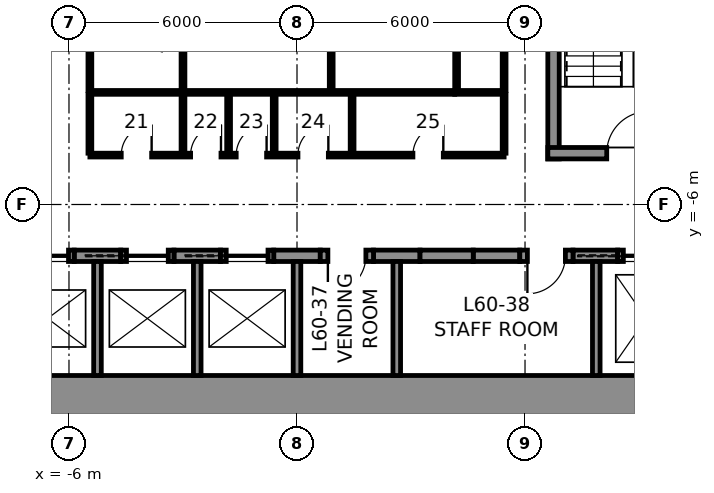
"""IFC4 building model, lengths in metres.
Left out: names, types, materials, properties, quantities, classifications, styles, units other than length and angle.
Written with IfcOpenShell. Run it as: python <this file> out.ifc"""

import sys

from ifc_helpers import new_model, si_unit, direction, frame, frame_2d, origin, place, context, subcontext, project, spatial, rectangle, extrude, element, fill, save


model = new_model("IFC4")
c1 = context("Model", 3, precision=1e-05, world=origin(), true_north=direction((0.0, 1.0)))
c2 = subcontext(c1, "Body", "Model", "MODEL_VIEW")
j1 = project(units=[si_unit("LENGTHUNIT", "METRE"), si_unit("PLANEANGLEUNIT", "RADIAN")], contexts=[c1])
p1 = place(None, origin())
s1 = spatial("IfcSite", under=j1, at=p1, CompositionType="ELEMENT")
p2 = place(p1, origin())
s2 = spatial("IfcBuilding", under=s1, at=p2, CompositionType="ELEMENT")
p3 = place(p2, frame((0.0, 0.0, 269.8)))
s3 = spatial("IfcBuildingStorey", under=s2, at=p3, CompositionType="ELEMENT", Elevation=269.8)
p4 = place(p3, frame((12.0, -11.25, 0.0), z_axis=(0.0, 0.0, 1.0), x_axis=(-1.0, 0.0, 0.0)))
e1 = element("IfcWall", 1, at=p4, inside=s3, PredefinedType="SHEAR", context=c2, shape_type="SweptSolid", body=[
    extrude(rectangle(XDim=24.0, YDim=1.5, at=frame_2d((12.0, 0.0))), origin(), (0.0, 0.0, 1.0), 4.0),
])
for number, where, z_axis, x_axis in (
    (2, (-5.863, -7.35, 0.0), (0.0, 0.0, 1.0), (1.0, 0.0, 0.0)),
    (3, (-3.238, -7.35, 0.0), (0.0, 0.0, 1.0), (1.0, 0.0, 0.0)),
    (4, (-0.613, -7.35, 0.0), (0.0, 0.0, 1.0), (1.0, 0.0, 0.0)),
    (5, (2.012, -7.35, 0.0), (0.0, 0.0, 1.0), (1.0, 0.0, 0.0)),
    (6, (4.637, -7.35, 0.0), (0.0, 0.0, 1.0), (1.0, 0.0, 0.0)),
):
    element("IfcWall", number, at=place(p3, frame(where, z_axis=z_axis, x_axis=x_axis)), inside=s3, PredefinedType="SHEAR", context=c2, shape_type="SweptSolid", body=[
        extrude(rectangle(XDim=1.225, YDim=0.3, at=frame_2d((0.613, 0.0))), origin(), (0.0, 0.0, 1.0), 4.0),
    ])
p5 = place(p3, frame((7.262, -7.35, 0.0), z_axis=(0.0, 0.0, 1.0), x_axis=(1.0, 0.0, 0.0)))
e7 = element("IfcWall", 7, at=p5, inside=s3, PredefinedType="SHEAR", context=c2, shape_type="SweptSolid", body=[
    extrude(rectangle(XDim=1.175, YDim=0.3, at=frame_2d((0.587, 0.0))), origin(), (0.0, 0.0, 1.0), 4.0),
])
p6 = place(p3, frame((-7.262, -7.35, 0.0), z_axis=(0.0, 0.0, 1.0), x_axis=(1.0, 0.0, 0.0)))
e8 = element("IfcWall", 8, at=p6, inside=s3, PredefinedType="PARTITIONING", context=c2, shape_type="SweptSolid", body=[
    extrude(rectangle(XDim=1.4, YDim=0.3, at=frame_2d((0.7, 0.0))), origin(), (0.0, 0.0, 1.0), 4.0),
])
p7 = place(p6, frame((0.15, 0.0, 0.0)))
e9 = element("IfcOpeningElement", 9, at=p7, cuts=e8, PredefinedType="OPENING", context=c2, shape_type="SweptSolid", body=[
    extrude(rectangle(XDim=1.1, YDim=2.3, at=frame_2d((0.55, 1.15))), frame((0.0, 0.16, 0.0), z_axis=(0.0, -1.0, 0.0), x_axis=(1.0, 0.0, 0.0)), (0.0, 0.0, 1.0), 0.32),
])
p8 = place(p3, frame((-4.637, -7.35, 0.0), z_axis=(0.0, 0.0, 1.0), x_axis=(1.0, 0.0, 0.0)))
e10 = element("IfcWall", 10, at=p8, inside=s3, PredefinedType="PARTITIONING", context=c2, shape_type="SweptSolid", body=[
    extrude(rectangle(XDim=1.4, YDim=0.3, at=frame_2d((0.7, 0.0))), origin(), (0.0, 0.0, 1.0), 4.0),
])
p9 = place(p8, frame((0.15, 0.0, 0.0)))
e11 = element("IfcOpeningElement", 11, at=p9, cuts=e10, PredefinedType="OPENING", context=c2, shape_type="SweptSolid", body=[
    extrude(rectangle(XDim=1.1, YDim=2.3, at=frame_2d((0.55, 1.15))), frame((0.0, 0.16, 0.0), z_axis=(0.0, -1.0, 0.0), x_axis=(1.0, 0.0, 0.0)), (0.0, 0.0, 1.0), 0.32),
])
p10 = place(p3, frame((-2.012, -7.35, 0.0), z_axis=(0.0, 0.0, 1.0), x_axis=(1.0, 0.0, 0.0)))
e12 = element("IfcWall", 12, at=p10, inside=s3, PredefinedType="PARTITIONING", context=c2, shape_type="SweptSolid", body=[
    extrude(rectangle(XDim=1.4, YDim=0.3, at=frame_2d((0.7, 0.0))), origin(), (0.0, 0.0, 1.0), 4.0),
])
p11 = place(p10, frame((0.15, 0.0, 0.0)))
e13 = element("IfcOpeningElement", 13, at=p11, cuts=e12, PredefinedType="OPENING", context=c2, shape_type="SweptSolid", body=[
    extrude(rectangle(XDim=1.1, YDim=2.3, at=frame_2d((0.55, 1.15))), frame((0.0, 0.16, 0.0), z_axis=(0.0, -1.0, 0.0), x_axis=(1.0, 0.0, 0.0)), (0.0, 0.0, 1.0), 0.32),
])
p12 = place(p3, frame((0.613, -7.35, 0.0), z_axis=(0.0, 0.0, 1.0), x_axis=(1.0, 0.0, 0.0)))
e14 = element("IfcWall", 14, at=p12, inside=s3, PredefinedType="PARTITIONING", context=c2, shape_type="SweptSolid", body=[
    extrude(rectangle(XDim=1.4, YDim=0.3, at=frame_2d((0.7, 0.0))), origin(), (0.0, 0.0, 1.0), 4.0),
])
p13 = place(p12, frame((0.2, 0.0, 0.0)))
e15 = element("IfcOpeningElement", 15, at=p13, cuts=e14, PredefinedType="OPENING", context=c2, shape_type="SweptSolid", body=[
    extrude(rectangle(XDim=1.0, YDim=2.3, at=frame_2d((0.5, 1.15))), frame((0.0, 0.16, 0.0), z_axis=(0.0, -1.0, 0.0), x_axis=(1.0, 0.0, 0.0)), (0.0, 0.0, 1.0), 0.32),
])
p14 = place(p3, frame((3.238, -7.35, 0.0), z_axis=(0.0, 0.0, 1.0), x_axis=(1.0, 0.0, 0.0)))
e16 = element("IfcWall", 16, at=p14, inside=s3, PredefinedType="PARTITIONING", context=c2, shape_type="SweptSolid", body=[
    extrude(rectangle(XDim=1.4, YDim=0.3, at=frame_2d((0.7, 0.0))), origin(), (0.0, 0.0, 1.0), 4.0),
])
p15 = place(p3, frame((5.863, -7.35, 0.0), z_axis=(0.0, 0.0, 1.0), x_axis=(1.0, 0.0, 0.0)))
e17 = element("IfcWall", 17, at=p15, inside=s3, PredefinedType="PARTITIONING", context=c2, shape_type="SweptSolid", body=[
    extrude(rectangle(XDim=1.4, YDim=0.3, at=frame_2d((0.7, 0.0))), origin(), (0.0, 0.0, 1.0), 4.0),
])
p16 = place(p15, frame((0.2, 0.0, 0.0)))
e18 = element("IfcOpeningElement", 18, at=p16, cuts=e17, PredefinedType="OPENING", context=c2, shape_type="SweptSolid", body=[
    extrude(rectangle(XDim=1.0, YDim=2.3, at=frame_2d((0.5, 1.15))), frame((0.0, 0.16, 0.0), z_axis=(0.0, -1.0, 0.0), x_axis=(1.0, 0.0, 0.0)), (0.0, 0.0, 1.0), 0.32),
])
p17 = place(p3, frame((8.438, -7.35, 0.0), z_axis=(0.0, 0.0, 1.0), x_axis=(1.0, 0.0, 0.0)))
e19 = element("IfcWall", 19, at=p17, inside=s3, PredefinedType="PARTITIONING", context=c2, shape_type="SweptSolid", body=[
    extrude(rectangle(XDim=1.5, YDim=0.3, at=frame_2d((0.75, 0.0))), origin(), (0.0, 0.0, 1.0), 4.0),
])
p18 = place(p17, frame((0.15, 0.0, 0.0)))
e20 = element("IfcOpeningElement", 20, at=p18, cuts=e19, PredefinedType="OPENING", context=c2, shape_type="SweptSolid", body=[
    extrude(rectangle(XDim=1.2, YDim=2.3, at=frame_2d((0.6, 1.15))), frame((0.0, 0.16, 0.0), z_axis=(0.0, -1.0, 0.0), x_axis=(1.0, 0.0, 0.0)), (0.0, 0.0, 1.0), 0.32),
])
for number, where, z_axis, x_axis in (
    (21, (-5.25, -10.5, 0.0), (0.0, 0.0, 1.0), (0.0, 1.0, 0.0)),
    (22, (-2.625, -10.5, 0.0), (0.0, 0.0, 1.0), (0.0, 1.0, 0.0)),
    (23, (0.0, -10.5, 0.0), (0.0, 0.0, 1.0), (0.0, 1.0, 0.0)),
    (24, (2.625, -10.5, 0.0), (0.0, 0.0, 1.0), (0.0, 1.0, 0.0)),
    (25, (7.875, -10.5, 0.0), (0.0, 0.0, 1.0), (0.0, 1.0, 0.0)),
):
    element("IfcWall", number, at=place(p3, frame(where, z_axis=z_axis, x_axis=x_axis)), inside=s3, PredefinedType="PARTITIONING", context=c2, shape_type="SweptSolid", body=[
        extrude(rectangle(XDim=3.0, YDim=0.2, at=frame_2d((1.5, 0.0))), origin(), (0.0, 0.0, 1.0), 4.0),
    ])
p19 = place(p3, frame((6.75, -4.8, 0.0), z_axis=(0.0, 0.0, 1.0), x_axis=(0.0, 1.0, 0.0)))
e26 = element("IfcWall", 26, at=p19, inside=s3, PredefinedType="SOLIDWALL", context=c2, shape_type="SweptSolid", body=[
    extrude(rectangle(XDim=9.6, YDim=0.3, at=frame_2d((4.8, 0.0))), origin(), (0.0, 0.0, 1.0), 3.75),
])
p20 = place(p3, frame((10.5, -4.65, 0.0), z_axis=(0.0, 0.0, 1.0), x_axis=(-1.0, 0.0, 0.0)))
e27 = element("IfcWall", 27, at=p20, inside=s3, PredefinedType="SOLIDWALL", context=c2, shape_type="SweptSolid", body=[
    extrude(rectangle(XDim=3.9, YDim=0.3, at=frame_2d((1.95, 0.0))), origin(), (0.0, 0.0, 1.0), 3.75),
])
p21 = place(p20, frame((1.25, 0.0, 0.0)))
e28 = element("IfcOpeningElement", 28, at=p21, cuts=e27, PredefinedType="OPENING", context=c2, shape_type="SweptSolid", body=[
    extrude(rectangle(XDim=1.1, YDim=2.3, at=frame_2d((0.55, 1.15))), frame((0.0, 0.16, 0.0), z_axis=(0.0, -1.0, 0.0), x_axis=(1.0, 0.0, 0.0)), (0.0, 0.0, 1.0), 0.32),
])
p22 = place(p3, frame((4.15, -3.05, 0.0), z_axis=(0.0, 0.0, 1.0), x_axis=(-1.0, 0.0, 0.0)))
e29 = element("IfcWall", 29, at=p22, inside=s3, PredefinedType="PARTITIONING", context=c2, shape_type="SweptSolid", body=[
    extrude(rectangle(XDim=9.6, YDim=0.1, at=frame_2d((4.8, 0.0))), origin(), (0.0, 0.0, 1.0), 3.75),
])
p23 = place(p3, frame((5.45, -3.05, 0.0), z_axis=(0.0, 0.0, 1.0), x_axis=(-1.0, 0.0, 0.0)))
e30 = element("IfcWall", 30, at=p23, inside=s3, PredefinedType="PARTITIONING", context=c2, shape_type="SweptSolid", body=[
    extrude(rectangle(XDim=1.3, YDim=0.1, at=frame_2d((0.65, 0.0))), origin(), (0.0, 0.0, 1.0), 3.75),
])
for number, where, z_axis, x_axis in (
    (31, (5.45, 3.0, 0.0), (0.0, 0.0, 1.0), (0.0, -1.0, 0.0)),
    (32, (-5.45, -3.0, 0.0), (0.0, 0.0, 1.0), (0.0, 1.0, 0.0)),
    (33, (-3.0, -3.0, 0.0), (0.0, 0.0, 1.0), (0.0, 1.0, 0.0)),
    (34, (0.9, -3.0, 0.0), (0.0, 0.0, 1.0), (0.0, 1.0, 0.0)),
    (35, (4.2, -3.0, 0.0), (0.0, 0.0, 1.0), (0.0, 1.0, 0.0)),
):
    element("IfcWall", number, at=place(p3, frame(where, z_axis=z_axis, x_axis=x_axis)), inside=s3, PredefinedType="PARTITIONING", context=c2, shape_type="SweptSolid", body=[
        extrude(rectangle(XDim=6.0, YDim=0.1, at=frame_2d((3.0, 0.0))), origin(), (0.0, 0.0, 1.0), 3.75),
    ])
p24 = place(p3, frame((5.45, -4.7, 0.0), z_axis=(0.0, 0.0, 1.0), x_axis=(-1.0, 0.0, 0.0)))
e36 = element("IfcWall", 36, at=p24, inside=s3, PredefinedType="PARTITIONING", context=c2, shape_type="SweptSolid", body=[
    extrude(rectangle(XDim=10.9, YDim=0.1, at=frame_2d((5.45, 0.0))), origin(), (0.0, 0.0, 1.0), 3.75),
])
p25 = place(p24, frame((9.275, 0.0, 0.0)))
e37 = element("IfcOpeningElement", 37, at=p25, cuts=e36, PredefinedType="OPENING", context=c2, shape_type="SweptSolid", body=[
    extrude(rectangle(XDim=0.8, YDim=2.3, at=frame_2d((0.4, 1.15))), frame((0.0, 0.06, 0.0), z_axis=(0.0, -1.0, 0.0), x_axis=(1.0, 0.0, 0.0)), (0.0, 0.0, 1.0), 0.12),
])
p26 = place(p24, frame((7.45, 0.0, 0.0)))
e38 = element("IfcOpeningElement", 38, at=p26, cuts=e36, PredefinedType="OPENING", context=c2, shape_type="SweptSolid", body=[
    extrude(rectangle(XDim=0.8, YDim=2.3, at=frame_2d((0.4, 1.15))), frame((0.0, 0.06, 0.0), z_axis=(0.0, -1.0, 0.0), x_axis=(1.0, 0.0, 0.0)), (0.0, 0.0, 1.0), 0.12),
])
p27 = place(p24, frame((6.25, 0.0, 0.0)))
e39 = element("IfcOpeningElement", 39, at=p27, cuts=e36, PredefinedType="OPENING", context=c2, shape_type="SweptSolid", body=[
    extrude(rectangle(XDim=0.8, YDim=2.3, at=frame_2d((0.4, 1.15))), frame((0.0, 0.06, 0.0), z_axis=(0.0, -1.0, 0.0), x_axis=(1.0, 0.0, 0.0)), (0.0, 0.0, 1.0), 0.12),
])
p28 = place(p24, frame((4.625, 0.0, 0.0)))
e40 = element("IfcOpeningElement", 40, at=p28, cuts=e36, PredefinedType="OPENING", context=c2, shape_type="SweptSolid", body=[
    extrude(rectangle(XDim=0.8, YDim=2.3, at=frame_2d((0.4, 1.15))), frame((0.0, 0.06, 0.0), z_axis=(0.0, -1.0, 0.0), x_axis=(1.0, 0.0, 0.0)), (0.0, 0.0, 1.0), 0.12),
])
p29 = place(p24, frame((1.6, 0.0, 0.0)))
e41 = element("IfcOpeningElement", 41, at=p29, cuts=e36, PredefinedType="OPENING", context=c2, shape_type="SweptSolid", body=[
    extrude(rectangle(XDim=0.8, YDim=2.3, at=frame_2d((0.4, 1.15))), frame((0.0, 0.06, 0.0), z_axis=(0.0, -1.0, 0.0), x_axis=(1.0, 0.0, 0.0)), (0.0, 0.0, 1.0), 0.12),
])
for number, where, z_axis, x_axis in (
    (42, (-5.45, -3.1, 0.0), (0.0, 0.0, 1.0), (0.0, -1.0, 0.0)),
    (43, (5.45, -3.1, 0.0), (0.0, 0.0, 1.0), (0.0, -1.0, 0.0)),
    (44, (-3.0, -3.1, 0.0), (0.0, 0.0, 1.0), (0.0, -1.0, 0.0)),
    (45, (-1.8, -3.1, 0.0), (0.0, 0.0, 1.0), (0.0, -1.0, 0.0)),
    (46, (-0.6, -3.1, 0.0), (0.0, 0.0, 1.0), (0.0, -1.0, 0.0)),
    (47, (1.45, -3.1, 0.0), (0.0, 0.0, 1.0), (0.0, -1.0, 0.0)),
):
    element("IfcWall", number, at=place(p3, frame(where, z_axis=z_axis, x_axis=x_axis)), inside=s3, PredefinedType="PARTITIONING", context=c2, shape_type="SweptSolid", body=[
        extrude(rectangle(XDim=1.55, YDim=0.1, at=frame_2d((0.775, 0.0))), origin(), (0.0, 0.0, 1.0), 3.75),
    ])
p30 = place(p21, frame((1.1, 0.0, 0.0), z_axis=(0.0, 0.0, 1.0), x_axis=(-1.0, 0.0, 0.0)))
e48 = element("IfcDoor", 48, at=p30, inside=s3, OperationType="SINGLE_SWING_RIGHT", PredefinedType="DOOR", context=c2, shape_type="SweptSolid", body=[
    extrude(rectangle(XDim=1.1, YDim=2.3, at=frame_2d((0.55, 1.15))), frame((0.0, 0.025, 0.0), z_axis=(0.0, -1.0, 0.0), x_axis=(1.0, 0.0, 0.0)), (0.0, 0.0, 1.0), 0.05),
])
fill(e28, e48)
p31 = place(p25, frame((0.8, 0.0, 0.0), z_axis=(0.0, 0.0, 1.0), x_axis=(-1.0, 0.0, 0.0)))
e49 = element("IfcDoor", 49, at=p31, inside=s3, OperationType="SINGLE_SWING_RIGHT", PredefinedType="DOOR", context=c2, shape_type="SweptSolid", body=[
    extrude(rectangle(XDim=0.8, YDim=2.3, at=frame_2d((0.4, 1.15))), frame((0.0, 0.025, 0.0), z_axis=(0.0, -1.0, 0.0), x_axis=(1.0, 0.0, 0.0)), (0.0, 0.0, 1.0), 0.05),
])
fill(e37, e49)
p32 = place(p26, frame((0.8, 0.0, 0.0), z_axis=(0.0, 0.0, 1.0), x_axis=(-1.0, 0.0, 0.0)))
e50 = element("IfcDoor", 50, at=p32, inside=s3, OperationType="SINGLE_SWING_RIGHT", PredefinedType="DOOR", context=c2, shape_type="SweptSolid", body=[
    extrude(rectangle(XDim=0.8, YDim=2.3, at=frame_2d((0.4, 1.15))), frame((0.0, 0.025, 0.0), z_axis=(0.0, -1.0, 0.0), x_axis=(1.0, 0.0, 0.0)), (0.0, 0.0, 1.0), 0.05),
])
fill(e38, e50)
p33 = place(p27, frame((0.8, 0.0, 0.0), z_axis=(0.0, 0.0, 1.0), x_axis=(-1.0, 0.0, 0.0)))
e51 = element("IfcDoor", 51, at=p33, inside=s3, OperationType="SINGLE_SWING_RIGHT", PredefinedType="DOOR", context=c2, shape_type="SweptSolid", body=[
    extrude(rectangle(XDim=0.8, YDim=2.3, at=frame_2d((0.4, 1.15))), frame((0.0, 0.025, 0.0), z_axis=(0.0, -1.0, 0.0), x_axis=(1.0, 0.0, 0.0)), (0.0, 0.0, 1.0), 0.05),
])
fill(e39, e51)
p34 = place(p28, frame((0.8, 0.0, 0.0), z_axis=(0.0, 0.0, 1.0), x_axis=(-1.0, 0.0, 0.0)))
e52 = element("IfcDoor", 52, at=p34, inside=s3, OperationType="SINGLE_SWING_RIGHT", PredefinedType="DOOR", context=c2, shape_type="SweptSolid", body=[
    extrude(rectangle(XDim=0.8, YDim=2.3, at=frame_2d((0.4, 1.15))), frame((0.0, 0.025, 0.0), z_axis=(0.0, -1.0, 0.0), x_axis=(1.0, 0.0, 0.0)), (0.0, 0.0, 1.0), 0.05),
])
fill(e40, e52)
p35 = place(p29, frame((0.8, 0.0, 0.0), z_axis=(0.0, 0.0, 1.0), x_axis=(-1.0, 0.0, 0.0)))
e53 = element("IfcDoor", 53, at=p35, inside=s3, OperationType="SINGLE_SWING_RIGHT", PredefinedType="DOOR", context=c2, shape_type="SweptSolid", body=[
    extrude(rectangle(XDim=0.8, YDim=2.3, at=frame_2d((0.4, 1.15))), frame((0.0, 0.025, 0.0), z_axis=(0.0, -1.0, 0.0), x_axis=(1.0, 0.0, 0.0)), (0.0, 0.0, 1.0), 0.05),
])
fill(e41, e53)
p36 = place(p13, frame((1.0, 0.0, 0.0), z_axis=(0.0, 0.0, 1.0), x_axis=(-1.0, 0.0, 0.0)))
e54 = element("IfcDoor", 54, at=p36, inside=s3, OperationType="SINGLE_SWING_RIGHT", PredefinedType="DOOR", context=c2, shape_type="SweptSolid", body=[
    extrude(rectangle(XDim=1.0, YDim=2.3, at=frame_2d((0.5, 1.15))), frame((0.0, 0.025, 0.0), z_axis=(0.0, -1.0, 0.0), x_axis=(1.0, 0.0, 0.0)), (0.0, 0.0, 1.0), 0.05),
])
fill(e15, e54)
p37 = place(p16, frame((1.0, 0.0, 0.0), z_axis=(0.0, 0.0, 1.0), x_axis=(-1.0, 0.0, 0.0)))
e55 = element("IfcDoor", 55, at=p37, inside=s3, OperationType="SINGLE_SWING_RIGHT", PredefinedType="DOOR", context=c2, shape_type="SweptSolid", body=[
    extrude(rectangle(XDim=1.0, YDim=2.3, at=frame_2d((0.5, 1.15))), frame((0.0, 0.025, 0.0), z_axis=(0.0, -1.0, 0.0), x_axis=(1.0, 0.0, 0.0)), (0.0, 0.0, 1.0), 0.05),
])
fill(e18, e55)
p38 = place(p18, origin())
e56 = element("IfcDoor", 56, at=p38, inside=s3, OperationType="SLIDING_TO_LEFT", PredefinedType="DOOR", context=c2, shape_type="SweptSolid", body=[
    extrude(rectangle(XDim=1.2, YDim=2.3, at=frame_2d((0.6, 1.15))), frame((0.0, 0.025, 0.0), z_axis=(0.0, -1.0, 0.0), x_axis=(1.0, 0.0, 0.0)), (0.0, 0.0, 1.0), 0.05),
])
fill(e20, e56)
p39 = place(p11, origin())
e57 = element("IfcDoor", 57, at=p39, inside=s3, OperationType="SLIDING_TO_LEFT", PredefinedType="DOOR", context=c2, shape_type="SweptSolid", body=[
    extrude(rectangle(XDim=1.1, YDim=2.3, at=frame_2d((0.55, 1.15))), frame((0.0, 0.025, 0.0), z_axis=(0.0, -1.0, 0.0), x_axis=(1.0, 0.0, 0.0)), (0.0, 0.0, 1.0), 0.05),
])
fill(e13, e57)
p40 = place(p9, origin())
e58 = element("IfcDoor", 58, at=p40, inside=s3, OperationType="SLIDING_TO_LEFT", PredefinedType="DOOR", context=c2, shape_type="SweptSolid", body=[
    extrude(rectangle(XDim=1.1, YDim=2.3, at=frame_2d((0.55, 1.15))), frame((0.0, 0.025, 0.0), z_axis=(0.0, -1.0, 0.0), x_axis=(1.0, 0.0, 0.0)), (0.0, 0.0, 1.0), 0.05),
])
fill(e11, e58)
p41 = place(p7, origin())
e59 = element("IfcDoor", 59, at=p41, inside=s3, OperationType="SLIDING_TO_LEFT", PredefinedType="DOOR", context=c2, shape_type="SweptSolid", body=[
    extrude(rectangle(XDim=1.1, YDim=2.3, at=frame_2d((0.55, 1.15))), frame((0.0, 0.025, 0.0), z_axis=(0.0, -1.0, 0.0), x_axis=(1.0, 0.0, 0.0)), (0.0, 0.0, 1.0), 0.05),
])
fill(e9, e59)
save(model, sys.argv[1])
